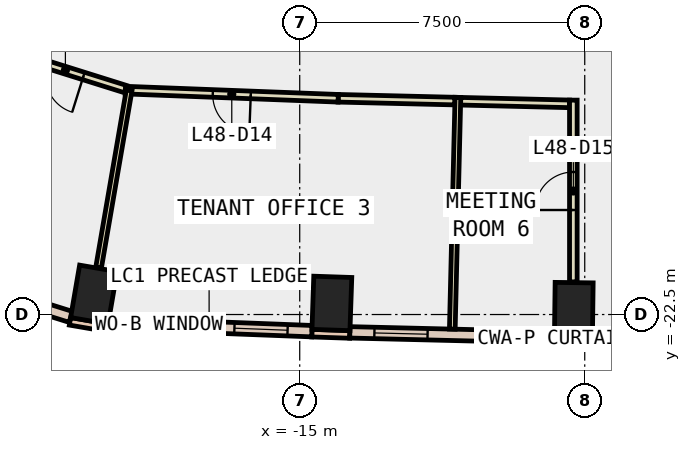
"""IFC4 building model, lengths in metres.
Left out: names, types, materials, properties, quantities, classifications, styles, units other than length and angle.
Written with IfcOpenShell. Run it as: python <this file> out.ifc"""

import sys

from ifc_helpers import new_model, si_unit, direction, frame, frame_2d, origin, origin_2d, place, context, subcontext, project, spatial, rectangle, extrude, element, fill, save


model = new_model("IFC4")
c1 = context("Model", 3, precision=1e-05, world=origin(), true_north=direction((0.0, 1.0)))
c2 = subcontext(c1, "Body", "Model", "MODEL_VIEW")
j1 = project(units=[si_unit("LENGTHUNIT", "METRE"), si_unit("PLANEANGLEUNIT", "RADIAN")], contexts=[c1])
p1 = place(None, origin())
s1 = spatial("IfcSite", under=j1, at=p1, CompositionType="ELEMENT")
p2 = place(p1, origin())
s2 = spatial("IfcBuilding", under=s1, at=p2, CompositionType="ELEMENT")
p3 = place(p2, frame((0.0, 0.0, 215.0)))
s3 = spatial("IfcBuildingStorey", under=s2, at=p3, CompositionType="ELEMENT", Elevation=215.0)
for number, where, z_axis, x_axis in (
    (1, (-20.417, -21.975, -0.4), (0.0, 0.0, 1.0), (-0.986, 0.169, 0.0)),
    (2, (-14.154, -22.208, -0.4), (0.0, 0.0, 1.0), (-0.999, 0.034, 0.0)),
    (3, (-7.788, -22.361, -0.4), (0.0, 0.0, 1.0), (-1.0, 0.013, 0.0)),
):
    element("IfcColumn", number, at=place(p3, frame(where, z_axis=z_axis, x_axis=x_axis)), inside=s3, PredefinedType="COLUMN", context=c2, shape_type="SweptSolid", body=[
        extrude(rectangle(XDim=1.0, YDim=1.4, at=origin_2d()), origin(), (0.0, 0.0, 1.0), 4.2),
    ])
p4 = place(p3, frame((-21.045, -22.679, 0.0), z_axis=(0.0, 0.0, 1.0), x_axis=(0.985631544579, -0.168909615862, 0.0)))
e4 = element("IfcWall", 4, at=p4, inside=s3, PredefinedType="STANDARD", context=c2, shape_type="SweptSolid", body=[
    extrude(rectangle(XDim=1.0, YDim=0.2, at=frame_2d((0.5, 0.0))), origin(), (0.0, 0.0, 1.0), 3.8),
])
p5 = place(p3, frame((-14.681, -22.99, 0.0), z_axis=(0.0, 0.0, 1.0), x_axis=(0.999423561854, -0.033949138587, 0.0)))
e5 = element("IfcWall", 5, at=p5, inside=s3, PredefinedType="STANDARD", context=c2, shape_type="SweptSolid", body=[
    extrude(rectangle(XDim=1.0, YDim=0.2, at=frame_2d((0.5, 0.0))), origin(), (0.0, 0.0, 1.0), 3.8),
])
p6 = place(p3, frame((-8.299, -23.154, 0.0), z_axis=(0.0, 0.0, 1.0), x_axis=(0.999903186316, -0.013914668364, 0.0)))
e6 = element("IfcWall", 6, at=p6, inside=s3, PredefinedType="STANDARD", context=c2, shape_type="SweptSolid", body=[
    extrude(rectangle(XDim=1.0, YDim=0.2, at=frame_2d((0.5, 0.0))), origin(), (0.0, 0.0, 1.0), 3.8),
])
p7 = place(p3, frame((-20.04, -22.732, 0.0), z_axis=(0.0, 0.0, 1.0), x_axis=(0.99926218254, -0.038406907512, 0.0)))
e7 = element("IfcWall", 7, at=p7, inside=s3, PredefinedType="STANDARD", context=c2, shape_type="SweptSolid", body=[
    extrude(rectangle(XDim=5.365, YDim=0.3, at=frame_2d((2.683, 0.0))), origin(), (0.0, 0.0, 1.0), 3.8),
])
p8 = place(p7, frame((0.641, 0.0, 0.9)))
e8 = element("IfcOpeningElement", 8, at=p8, cuts=e7, PredefinedType="OPENING", context=c2, shape_type="SweptSolid", body=[
    extrude(rectangle(XDim=1.4, YDim=2.6, at=frame_2d((0.7, 1.3))), frame((0.0, 0.16, 0.0), z_axis=(0.0, -1.0, 0.0), x_axis=(1.0, 0.0, 0.0)), (0.0, 0.0, 1.0), 0.32),
])
p9 = place(p7, frame((3.324, 0.0, 0.9)))
e9 = element("IfcOpeningElement", 9, at=p9, cuts=e7, PredefinedType="OPENING", context=c2, shape_type="SweptSolid", body=[
    extrude(rectangle(XDim=1.4, YDim=2.6, at=frame_2d((0.7, 1.3))), frame((0.0, 0.16, 0.0), z_axis=(0.0, -1.0, 0.0), x_axis=(1.0, 0.0, 0.0)), (0.0, 0.0, 1.0), 0.32),
])
p10 = place(p3, frame((-13.681, -22.969, 0.0), z_axis=(0.0, 0.0, 1.0), x_axis=(0.999708030006, -0.024163086341, 0.0)))
e10 = element("IfcWall", 10, at=p10, inside=s3, PredefinedType="STANDARD", context=c2, shape_type="SweptSolid", body=[
    extrude(rectangle(XDim=5.385, YDim=0.3, at=frame_2d((2.693, 0.0))), origin(), (0.0, 0.0, 1.0), 3.8),
])
p11 = place(p10, frame((0.646, 0.0, 0.9)))
e11 = element("IfcOpeningElement", 11, at=p11, cuts=e10, PredefinedType="OPENING", context=c2, shape_type="SweptSolid", body=[
    extrude(rectangle(XDim=1.4, YDim=2.6, at=frame_2d((0.7, 1.3))), frame((0.0, 0.16, 0.0), z_axis=(0.0, -1.0, 0.0), x_axis=(1.0, 0.0, 0.0)), (0.0, 0.0, 1.0), 0.32),
])
p12 = place(p10, frame((3.339, 0.0, 0.9)))
e12 = element("IfcOpeningElement", 12, at=p12, cuts=e10, PredefinedType="OPENING", context=c2, shape_type="SweptSolid", body=[
    extrude(rectangle(XDim=1.4, YDim=2.6, at=frame_2d((0.7, 1.3))), frame((0.0, 0.16, 0.0), z_axis=(0.0, -1.0, 0.0), x_axis=(1.0, 0.0, 0.0)), (0.0, 0.0, 1.0), 0.32),
])
p13 = place(p3, frame((-25.367, -21.202, 0.0), z_axis=(0.0, 0.0, 1.0), x_axis=(0.954297481837, -0.298858354675, 0.0)))
e13 = element("IfcWall", 13, at=p13, inside=s3, PredefinedType="STANDARD", context=c2, shape_type="SweptSolid", body=[
    extrude(rectangle(XDim=4.551, YDim=0.3, at=frame_2d((2.275, 0.0))), origin(), (0.0, 0.0, 1.0), 3.8),
])
p14 = place(p13, frame((1.575, 0.0, 0.9)))
e14 = element("IfcOpeningElement", 14, at=p14, cuts=e13, PredefinedType="OPENING", context=c2, shape_type="SweptSolid", body=[
    extrude(rectangle(XDim=1.4, YDim=2.6, at=frame_2d((0.7, 1.3))), frame((0.0, 0.16, 0.0), z_axis=(0.0, -1.0, 0.0), x_axis=(1.0, 0.0, 0.0)), (0.0, 0.0, 1.0), 0.32),
])
p15 = place(p3, frame((-19.583, -16.569, 0.0), z_axis=(0.0, 0.0, 1.0), x_axis=(-0.954238750745, 0.299045826884, 0.0)))
e15 = element("IfcWall", 15, at=p15, inside=s3, PredefinedType="PARTITIONING", context=c2, shape_type="SweptSolid", body=[
    extrude(rectangle(XDim=3.318, YDim=0.2, at=frame_2d((1.659, 0.0))), origin(), (0.0, 0.0, 1.0), 3.8),
])
p16 = place(p15, frame((1.159, 0.0, 0.0)))
e16 = element("IfcOpeningElement", 16, at=p16, cuts=e15, PredefinedType="OPENING", context=c2, shape_type="SweptSolid", body=[
    extrude(rectangle(XDim=1.0, YDim=2.1, at=frame_2d((0.5, 1.05))), frame((0.0, 0.11, 0.0), z_axis=(0.0, -1.0, 0.0), x_axis=(1.0, 0.0, 0.0)), (0.0, 0.0, 1.0), 0.22),
])
p17 = place(p3, frame((-10.915, -16.884, 0.0), z_axis=(0.0, 0.0, 1.0), x_axis=(-0.999710384303, 0.024065483947, 0.0)))
e17 = element("IfcWall", 17, at=p17, inside=s3, PredefinedType="PARTITIONING", context=c2, shape_type="SweptSolid", body=[
    extrude(rectangle(XDim=3.074, YDim=0.2, at=frame_2d((1.537, 0.0))), origin(), (0.0, 0.0, 1.0), 3.8),
])
p18 = place(p3, frame((-13.988, -16.81, 0.0), z_axis=(0.0, 0.0, 1.0), x_axis=(-0.999263168163, 0.038381255227, 0.0)))
e18 = element("IfcWall", 18, at=p18, inside=s3, PredefinedType="PARTITIONING", context=c2, shape_type="SweptSolid", body=[
    extrude(rectangle(XDim=5.604, YDim=0.2, at=frame_2d((2.802, 0.0))), origin(), (0.0, 0.0, 1.0), 3.8),
])
p19 = place(p18, frame((2.302, 0.0, 0.0)))
e19 = element("IfcOpeningElement", 19, at=p19, cuts=e18, PredefinedType="OPENING", context=c2, shape_type="SweptSolid", body=[
    extrude(rectangle(XDim=1.0, YDim=2.1, at=frame_2d((0.5, 1.05))), frame((0.0, 0.11, 0.0), z_axis=(0.0, -1.0, 0.0), x_axis=(1.0, 0.0, 0.0)), (0.0, 0.0, 1.0), 0.22),
])
p20 = place(p3, frame((-7.9, -16.957, 0.0), z_axis=(0.0, 0.0, 1.0), x_axis=(-0.999709338637, 0.024108883071, 0.0)))
e20 = element("IfcWall", 20, at=p20, inside=s3, PredefinedType="PARTITIONING", context=c2, shape_type="SweptSolid", body=[
    extrude(rectangle(XDim=2.866, YDim=0.2, at=frame_2d((1.433, 0.0))), origin(), (0.0, 0.0, 1.0), 3.8),
])
p21 = place(p3, frame((-7.8, -21.641, 0.0), z_axis=(0.0, 0.0, 1.0), x_axis=(0.0, 1.0, 0.0)))
e21 = element("IfcWall", 21, at=p21, inside=s3, PredefinedType="PARTITIONING", context=c2, shape_type="SweptSolid", body=[
    extrude(rectangle(XDim=4.782, YDim=0.2, at=frame_2d((2.391, 0.0))), origin(), (0.0, 0.0, 1.0), 3.8),
])
p22 = place(p21, frame((1.891, 0.0, 0.0)))
e22 = element("IfcOpeningElement", 22, at=p22, cuts=e21, PredefinedType="OPENING", context=c2, shape_type="SweptSolid", body=[
    extrude(rectangle(XDim=1.0, YDim=2.1, at=frame_2d((0.5, 1.05))), frame((0.0, 0.11, 0.0), z_axis=(0.0, -1.0, 0.0), x_axis=(1.0, 0.0, 0.0)), (0.0, 0.0, 1.0), 0.22),
])
p23 = place(p3, frame((-19.488, -16.599, 0.0), z_axis=(0.0, 0.0, 1.0), x_axis=(-0.169963884325, -0.985450292011, 0.0)))
e23 = element("IfcWall", 23, at=p23, inside=s3, PredefinedType="PARTITIONING", context=c2, shape_type="SweptSolid", body=[
    extrude(rectangle(XDim=4.736, YDim=0.15, at=frame_2d((2.368, 0.0))), origin(), (0.0, 0.0, 1.0), 3.8),
])
p24 = place(p3, frame((-10.838, -16.786, 0.0), z_axis=(0.0, 0.0, 1.0), x_axis=(-0.024134212614, -0.999708727471, 0.0)))
e24 = element("IfcWall", 24, at=p24, inside=s3, PredefinedType="PARTITIONING", context=c2, shape_type="SweptSolid", body=[
    extrude(rectangle(XDim=6.1, YDim=0.15, at=frame_2d((3.05, 0.0))), origin(), (0.0, 0.0, 1.0), 3.8),
])
p25 = place(p8, origin())
e25 = element("IfcWindow", 25, at=p25, inside=s3, PartitioningType="SINGLE_PANEL", PredefinedType="WINDOW", context=c2, shape_type="SweptSolid", body=[
    extrude(rectangle(XDim=1.4, YDim=2.6, at=frame_2d((0.7, 1.3))), frame((0.0, 0.03, 0.0), z_axis=(0.0, -1.0, 0.0), x_axis=(1.0, 0.0, 0.0)), (0.0, 0.0, 1.0), 0.06),
])
fill(e8, e25)
p26 = place(p9, origin())
e26 = element("IfcWindow", 26, at=p26, inside=s3, PartitioningType="SINGLE_PANEL", PredefinedType="WINDOW", context=c2, shape_type="SweptSolid", body=[
    extrude(rectangle(XDim=1.4, YDim=2.6, at=frame_2d((0.7, 1.3))), frame((0.0, 0.03, 0.0), z_axis=(0.0, -1.0, 0.0), x_axis=(1.0, 0.0, 0.0)), (0.0, 0.0, 1.0), 0.06),
])
fill(e9, e26)
p27 = place(p11, origin())
e27 = element("IfcWindow", 27, at=p27, inside=s3, PartitioningType="SINGLE_PANEL", PredefinedType="WINDOW", context=c2, shape_type="SweptSolid", body=[
    extrude(rectangle(XDim=1.4, YDim=2.6, at=frame_2d((0.7, 1.3))), frame((0.0, 0.03, 0.0), z_axis=(0.0, -1.0, 0.0), x_axis=(1.0, 0.0, 0.0)), (0.0, 0.0, 1.0), 0.06),
])
fill(e11, e27)
p28 = place(p12, origin())
e28 = element("IfcWindow", 28, at=p28, inside=s3, PartitioningType="SINGLE_PANEL", PredefinedType="WINDOW", context=c2, shape_type="SweptSolid", body=[
    extrude(rectangle(XDim=1.4, YDim=2.6, at=frame_2d((0.7, 1.3))), frame((0.0, 0.03, 0.0), z_axis=(0.0, -1.0, 0.0), x_axis=(1.0, 0.0, 0.0)), (0.0, 0.0, 1.0), 0.06),
])
fill(e12, e28)
p29 = place(p16, origin())
e29 = element("IfcDoor", 29, at=p29, inside=s3, OperationType="SINGLE_SWING_RIGHT", PredefinedType="DOOR", context=c2, shape_type="SweptSolid", body=[
    extrude(rectangle(XDim=1.0, YDim=2.1, at=frame_2d((0.5, 1.05))), frame((0.0, 0.025, 0.0), z_axis=(0.0, -1.0, 0.0), x_axis=(1.0, 0.0, 0.0)), (0.0, 0.0, 1.0), 0.05),
])
fill(e16, e29)
p30 = place(p19, origin())
e30 = element("IfcDoor", 30, at=p30, inside=s3, OperationType="SINGLE_SWING_LEFT", PredefinedType="DOOR", context=c2, shape_type="SweptSolid", body=[
    extrude(rectangle(XDim=1.0, YDim=2.1, at=frame_2d((0.5, 1.05))), frame((0.0, 0.025, 0.0), z_axis=(0.0, -1.0, 0.0), x_axis=(1.0, 0.0, 0.0)), (0.0, 0.0, 1.0), 0.05),
])
fill(e19, e30)
p31 = place(p22, origin())
e31 = element("IfcDoor", 31, at=p31, inside=s3, OperationType="SINGLE_SWING_LEFT", PredefinedType="DOOR", context=c2, shape_type="SweptSolid", body=[
    extrude(rectangle(XDim=1.0, YDim=2.1, at=frame_2d((0.5, 1.05))), frame((0.0, 0.025, 0.0), z_axis=(0.0, -1.0, 0.0), x_axis=(1.0, 0.0, 0.0)), (0.0, 0.0, 1.0), 0.05),
])
fill(e22, e31)
save(model, sys.argv[1])
